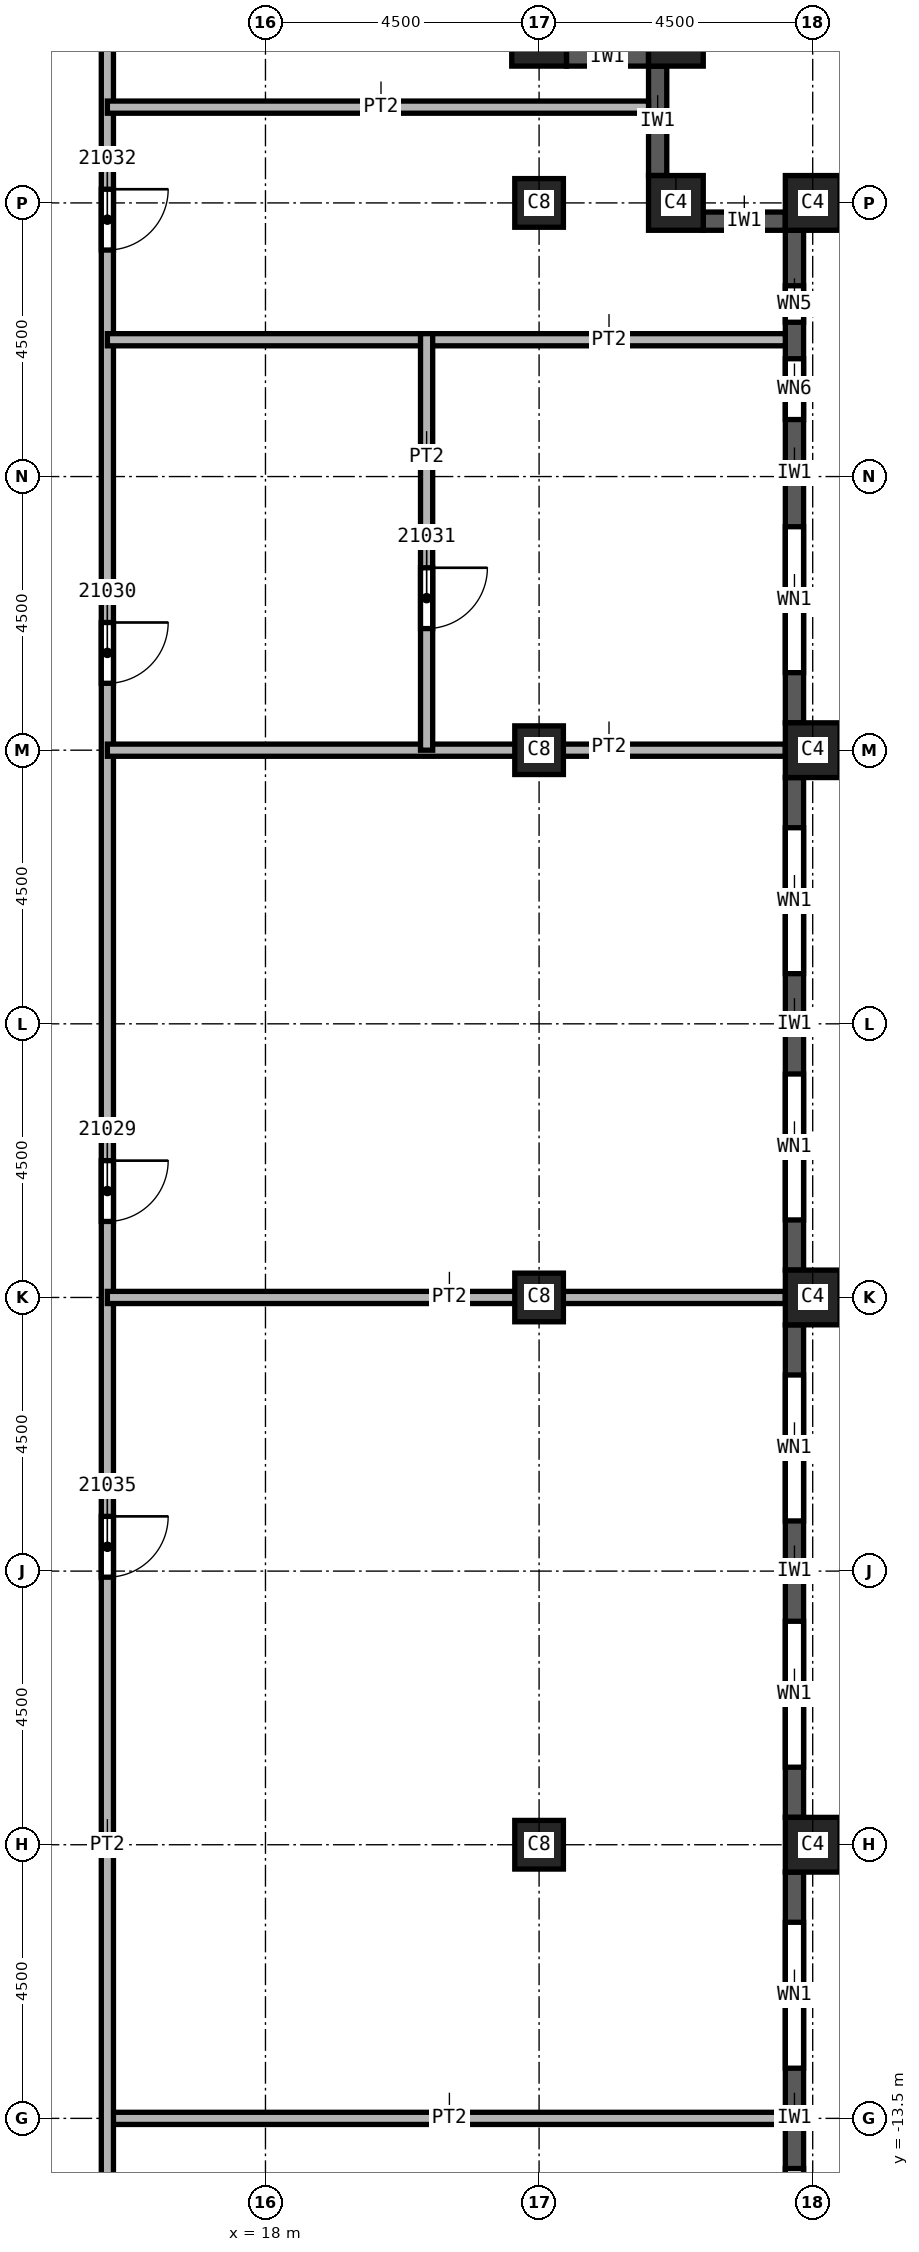
"""IFC4 building model, lengths in metres.
Left out: names, types, materials, properties, quantities, classifications, styles, units other than length and angle.
Written with IfcOpenShell. Run it as: python <this file> out.ifc"""

import sys

from ifc_helpers import new_model, si_unit, direction, frame, frame_2d, origin, origin_2d, place, context, subcontext, project, spatial, rectangle, extrude, element, fill, save


model = new_model("IFC4")
c1 = context("Model", 3, precision=1e-05, world=origin(), true_north=direction((0.0, 1.0)))
c2 = subcontext(c1, "Body", "Model", "MODEL_VIEW")
j1 = project(units=[si_unit("LENGTHUNIT", "METRE"), si_unit("PLANEANGLEUNIT", "RADIAN")], contexts=[c1])
p1 = place(None, origin())
s1 = spatial("IfcSite", under=j1, at=p1, CompositionType="ELEMENT")
p2 = place(p1, origin())
s2 = spatial("IfcBuilding", under=s1, at=p2, CompositionType="ELEMENT")
p3 = place(p2, frame((0.0, 0.0, 300.0)))
s3 = spatial("IfcBuildingStorey", under=s2, at=p3, CompositionType="ELEMENT", Elevation=300.0)
for number, where, z_axis, x_axis in (
    (1, (22.5, 0.0, 0.0), (0.0, 0.0, 1.0), (1.0, 0.0, 0.0)),
    (2, (22.5, 9.0, 0.0), (0.0, 0.0, 1.0), (1.0, 0.0, 0.0)),
    (3, (22.5, 18.0, 0.0), (0.0, 0.0, 1.0), (1.0, 0.0, 0.0)),
    (4, (22.5, -9.0, 0.0), (0.0, 0.0, 1.0), (1.0, 0.0, 0.0)),
):
    element("IfcColumn", number, at=place(p3, frame(where, z_axis=z_axis, x_axis=x_axis)), inside=s3, PredefinedType="COLUMN", context=c2, shape_type="SweptSolid", body=[
        extrude(rectangle(XDim=0.8, YDim=0.8, at=origin_2d()), origin(), (0.0, 0.0, 1.0), 3.74),
    ])
for number, where, z_axis, x_axis in (
    (5, (27.0, 0.0, 0.0), (0.0, 0.0, 1.0), (0.0, 1.0, 0.0)),
    (6, (27.0, 9.0, 0.0), (0.0, 0.0, 1.0), (0.0, 1.0, 0.0)),
    (7, (27.0, 18.0, 0.0), (0.0, 0.0, 1.0), (0.0, 1.0, 0.0)),
    (8, (27.0, -9.0, 0.0), (0.0, 0.0, 1.0), (0.0, 1.0, 0.0)),
    (9, (22.5, 20.7, 0.0), (0.0, 0.0, 1.0), (1.0, 0.0, 0.0)),
    (10, (24.75, 20.7, 0.0), (0.0, 0.0, 1.0), (1.0, 0.0, 0.0)),
    (11, (24.75, 18.0, 0.0), (0.0, 0.0, 1.0), (1.0, 0.0, 0.0)),
):
    element("IfcColumn", number, at=place(p3, frame(where, z_axis=z_axis, x_axis=x_axis)), inside=s3, PredefinedType="COLUMN", context=c2, shape_type="SweptSolid", body=[
        extrude(rectangle(XDim=0.9, YDim=0.9, at=origin_2d()), origin(), (0.0, 0.0, 1.0), 3.74),
    ])
p4 = place(p3, frame((26.7, -17.55, 0.0), z_axis=(0.0, 0.0, 1.0), x_axis=(0.0, 1.0, 0.0)))
e12 = element("IfcWall", 12, at=p4, inside=s3, PredefinedType="SOLIDWALL", context=c2, shape_type="SweptSolid", body=[
    extrude(rectangle(XDim=8.1, YDim=0.3, at=frame_2d((4.05, 0.0))), origin(), (0.0, 0.0, 1.0), 3.14),
])
p5 = place(p4, frame((0.825, 0.0, 0.8)))
e13 = element("IfcOpeningElement", 13, at=p5, cuts=e12, PredefinedType="OPENING", context=c2, shape_type="SweptSolid", body=[
    extrude(rectangle(XDim=2.4, YDim=1.95, at=frame_2d((1.2, 0.975))), frame((0.0, 0.15, 0.0), z_axis=(0.0, -1.0, 0.0), x_axis=(1.0, 0.0, 0.0)), (0.0, 0.0, 1.0), 0.3),
])
p6 = place(p4, frame((4.875, 0.0, 0.8)))
e14 = element("IfcOpeningElement", 14, at=p6, cuts=e12, PredefinedType="OPENING", context=c2, shape_type="SweptSolid", body=[
    extrude(rectangle(XDim=2.4, YDim=1.95, at=frame_2d((1.2, 0.975))), frame((0.0, 0.15, 0.0), z_axis=(0.0, -1.0, 0.0), x_axis=(1.0, 0.0, 0.0)), (0.0, 0.0, 1.0), 0.3),
])
p7 = place(p3, frame((26.7, -8.55, 0.0), z_axis=(0.0, 0.0, 1.0), x_axis=(0.0, 1.0, 0.0)))
e15 = element("IfcWall", 15, at=p7, inside=s3, PredefinedType="SOLIDWALL", context=c2, shape_type="SweptSolid", body=[
    extrude(rectangle(XDim=8.1, YDim=0.3, at=frame_2d((4.05, 0.0))), origin(), (0.0, 0.0, 1.0), 3.14),
])
p8 = place(p7, frame((0.825, 0.0, 0.8)))
e16 = element("IfcOpeningElement", 16, at=p8, cuts=e15, PredefinedType="OPENING", context=c2, shape_type="SweptSolid", body=[
    extrude(rectangle(XDim=2.4, YDim=1.95, at=frame_2d((1.2, 0.975))), frame((0.0, 0.15, 0.0), z_axis=(0.0, -1.0, 0.0), x_axis=(1.0, 0.0, 0.0)), (0.0, 0.0, 1.0), 0.3),
])
p9 = place(p7, frame((4.875, 0.0, 0.8)))
e17 = element("IfcOpeningElement", 17, at=p9, cuts=e15, PredefinedType="OPENING", context=c2, shape_type="SweptSolid", body=[
    extrude(rectangle(XDim=2.4, YDim=1.95, at=frame_2d((1.2, 0.975))), frame((0.0, 0.15, 0.0), z_axis=(0.0, -1.0, 0.0), x_axis=(1.0, 0.0, 0.0)), (0.0, 0.0, 1.0), 0.3),
])
p10 = place(p3, frame((26.7, 0.45, 0.0), z_axis=(0.0, 0.0, 1.0), x_axis=(0.0, 1.0, 0.0)))
e18 = element("IfcWall", 18, at=p10, inside=s3, PredefinedType="SOLIDWALL", context=c2, shape_type="SweptSolid", body=[
    extrude(rectangle(XDim=8.1, YDim=0.3, at=frame_2d((4.05, 0.0))), origin(), (0.0, 0.0, 1.0), 3.14),
])
p11 = place(p10, frame((0.825, 0.0, 0.8)))
e19 = element("IfcOpeningElement", 19, at=p11, cuts=e18, PredefinedType="OPENING", context=c2, shape_type="SweptSolid", body=[
    extrude(rectangle(XDim=2.4, YDim=1.95, at=frame_2d((1.2, 0.975))), frame((0.0, 0.15, 0.0), z_axis=(0.0, -1.0, 0.0), x_axis=(1.0, 0.0, 0.0)), (0.0, 0.0, 1.0), 0.3),
])
p12 = place(p10, frame((4.875, 0.0, 0.8)))
e20 = element("IfcOpeningElement", 20, at=p12, cuts=e18, PredefinedType="OPENING", context=c2, shape_type="SweptSolid", body=[
    extrude(rectangle(XDim=2.4, YDim=1.95, at=frame_2d((1.2, 0.975))), frame((0.0, 0.15, 0.0), z_axis=(0.0, -1.0, 0.0), x_axis=(1.0, 0.0, 0.0)), (0.0, 0.0, 1.0), 0.3),
])
p13 = place(p3, frame((26.7, 9.45, 0.0), z_axis=(0.0, 0.0, 1.0), x_axis=(0.0, 1.0, 0.0)))
e21 = element("IfcWall", 21, at=p13, inside=s3, PredefinedType="SOLIDWALL", context=c2, shape_type="SweptSolid", body=[
    extrude(rectangle(XDim=8.1, YDim=0.3, at=frame_2d((4.05, 0.0))), origin(), (0.0, 0.0, 1.0), 3.14),
])
p14 = place(p13, frame((0.825, 0.0, 0.8)))
e22 = element("IfcOpeningElement", 22, at=p14, cuts=e21, PredefinedType="OPENING", context=c2, shape_type="SweptSolid", body=[
    extrude(rectangle(XDim=2.4, YDim=1.95, at=frame_2d((1.2, 0.975))), frame((0.0, 0.15, 0.0), z_axis=(0.0, -1.0, 0.0), x_axis=(1.0, 0.0, 0.0)), (0.0, 0.0, 1.0), 0.3),
])
p15 = place(p13, frame((4.988, 0.0, 0.8)))
e23 = element("IfcOpeningElement", 23, at=p15, cuts=e21, PredefinedType="OPENING", context=c2, shape_type="SweptSolid", body=[
    extrude(rectangle(XDim=1.0, YDim=1.95, at=frame_2d((0.5, 0.975))), frame((0.0, 0.15, 0.0), z_axis=(0.0, -1.0, 0.0), x_axis=(1.0, 0.0, 0.0)), (0.0, 0.0, 1.0), 0.3),
])
p16 = place(p13, frame((6.587, 0.0, 0.8)))
e24 = element("IfcOpeningElement", 24, at=p16, cuts=e21, PredefinedType="OPENING", context=c2, shape_type="SweptSolid", body=[
    extrude(rectangle(XDim=0.6, YDim=1.95, at=frame_2d((0.3, 0.975))), frame((0.0, 0.15, 0.0), z_axis=(0.0, -1.0, 0.0), x_axis=(1.0, 0.0, 0.0)), (0.0, 0.0, 1.0), 0.3),
])
p17 = place(p3, frame((26.55, 17.7, 0.0), z_axis=(0.0, 0.0, 1.0), x_axis=(-1.0, 0.0, 0.0)))
e25 = element("IfcWall", 25, at=p17, inside=s3, PredefinedType="SOLIDWALL", context=c2, shape_type="SweptSolid", body=[
    extrude(rectangle(XDim=1.35, YDim=0.3, at=frame_2d((0.675, 0.0))), origin(), (0.0, 0.0, 1.0), 3.14),
])
p18 = place(p3, frame((24.45, 18.45, 0.0), z_axis=(0.0, 0.0, 1.0), x_axis=(0.0, 1.0, 0.0)))
e26 = element("IfcWall", 26, at=p18, inside=s3, PredefinedType="SOLIDWALL", context=c2, shape_type="SweptSolid", body=[
    extrude(rectangle(XDim=1.8, YDim=0.3, at=frame_2d((0.9, 0.0))), origin(), (0.0, 0.0, 1.0), 3.14),
])
p19 = place(p3, frame((24.3, 20.4, 0.0), z_axis=(0.0, 0.0, 1.0), x_axis=(-1.0, 0.0, 0.0)))
e27 = element("IfcWall", 27, at=p19, inside=s3, PredefinedType="SOLIDWALL", context=c2, shape_type="SweptSolid", body=[
    extrude(rectangle(XDim=1.35, YDim=0.3, at=frame_2d((0.675, 0.0))), origin(), (0.0, 0.0, 1.0), 3.14),
])
p20 = place(p3, frame((15.4, -13.5, 0.0), z_axis=(0.0, 0.0, 1.0), x_axis=(1.0, 0.0, 0.0)))
e28 = element("IfcWall", 28, at=p20, inside=s3, PredefinedType="PARTITIONING", context=c2, shape_type="SweptSolid", body=[
    extrude(rectangle(XDim=11.15, YDim=0.2, at=frame_2d((5.575, 0.0))), origin(), (0.0, 0.0, 1.0), 3.74),
])
p21 = place(p3, frame((15.4, 22.95, 0.0), z_axis=(0.0, 0.0, 1.0), x_axis=(0.0, -1.0, 0.0)))
e29 = element("IfcWall", 29, at=p21, inside=s3, PredefinedType="PARTITIONING", context=c2, shape_type="SweptSolid", body=[
    extrude(rectangle(XDim=45.9, YDim=0.2, at=frame_2d((22.95, 0.0))), origin(), (0.0, 0.0, 1.0), 3.74),
])
p22 = place(p21, frame((20.7, 0.0, 0.0)))
e30 = element("IfcOpeningElement", 30, at=p22, cuts=e29, PredefinedType="OPENING", context=c2, shape_type="SweptSolid", body=[
    extrude(rectangle(XDim=1.0, YDim=2.1, at=frame_2d((0.5, 1.05))), frame((0.0, 0.1, 0.0), z_axis=(0.0, -1.0, 0.0), x_axis=(1.0, 0.0, 0.0)), (0.0, 0.0, 1.0), 0.2),
])
p23 = place(p21, frame((11.85, 0.0, 0.0)))
e31 = element("IfcOpeningElement", 31, at=p23, cuts=e29, PredefinedType="OPENING", context=c2, shape_type="SweptSolid", body=[
    extrude(rectangle(XDim=1.0, YDim=2.1, at=frame_2d((0.5, 1.05))), frame((0.0, 0.1, 0.0), z_axis=(0.0, -1.0, 0.0), x_axis=(1.0, 0.0, 0.0)), (0.0, 0.0, 1.0), 0.2),
])
p24 = place(p21, frame((4.725, 0.0, 0.0)))
e32 = element("IfcOpeningElement", 32, at=p24, cuts=e29, PredefinedType="OPENING", context=c2, shape_type="SweptSolid", body=[
    extrude(rectangle(XDim=1.0, YDim=2.1, at=frame_2d((0.5, 1.05))), frame((0.0, 0.1, 0.0), z_axis=(0.0, -1.0, 0.0), x_axis=(1.0, 0.0, 0.0)), (0.0, 0.0, 1.0), 0.2),
])
p25 = place(p21, frame((0.4, 0.0, 0.0)))
e33 = element("IfcOpeningElement", 33, at=p25, cuts=e29, PredefinedType="OPENING", context=c2, shape_type="SweptSolid", body=[
    extrude(rectangle(XDim=1.0, YDim=2.1, at=frame_2d((0.5, 1.05))), frame((0.0, 0.1, 0.0), z_axis=(0.0, -1.0, 0.0), x_axis=(1.0, 0.0, 0.0)), (0.0, 0.0, 1.0), 0.2),
])
p26 = place(p21, frame((38.85, 0.0, 0.0)))
e34 = element("IfcOpeningElement", 34, at=p26, cuts=e29, PredefinedType="OPENING", context=c2, shape_type="SweptSolid", body=[
    extrude(rectangle(XDim=1.0, YDim=2.1, at=frame_2d((0.5, 1.05))), frame((0.0, 0.1, 0.0), z_axis=(0.0, -1.0, 0.0), x_axis=(1.0, 0.0, 0.0)), (0.0, 0.0, 1.0), 0.2),
])
p27 = place(p21, frame((26.55, 0.0, 0.0)))
e35 = element("IfcOpeningElement", 35, at=p27, cuts=e29, PredefinedType="OPENING", context=c2, shape_type="SweptSolid", body=[
    extrude(rectangle(XDim=1.0, YDim=2.1, at=frame_2d((0.5, 1.05))), frame((0.0, 0.1, 0.0), z_axis=(0.0, -1.0, 0.0), x_axis=(1.0, 0.0, 0.0)), (0.0, 0.0, 1.0), 0.2),
])
for number, where, z_axis, x_axis in (
    (36, (15.4, 9.0, 0.0), (0.0, 0.0, 1.0), (1.0, 0.0, 0.0)),
    (37, (15.4, 15.75, 0.0), (0.0, 0.0, 1.0), (1.0, 0.0, 0.0)),
):
    element("IfcWall", number, at=place(p3, frame(where, z_axis=z_axis, x_axis=x_axis)), inside=s3, PredefinedType="PARTITIONING", context=c2, shape_type="SweptSolid", body=[
        extrude(rectangle(XDim=11.15, YDim=0.2, at=frame_2d((5.575, 0.0))), origin(), (0.0, 0.0, 1.0), 3.74),
    ])
p28 = place(p3, frame((15.4, 19.575, 0.0), z_axis=(0.0, 0.0, 1.0), x_axis=(1.0, 0.0, 0.0)))
e38 = element("IfcWall", 38, at=p28, inside=s3, PredefinedType="PARTITIONING", context=c2, shape_type="SweptSolid", body=[
    extrude(rectangle(XDim=8.9, YDim=0.2, at=frame_2d((4.45, 0.0))), origin(), (0.0, 0.0, 1.0), 3.74),
])
p29 = place(p3, frame((20.65, 15.85, 0.0), z_axis=(0.0, 0.0, 1.0), x_axis=(0.0, -1.0, 0.0)))
e39 = element("IfcWall", 39, at=p29, inside=s3, PredefinedType="PARTITIONING", context=c2, shape_type="SweptSolid", body=[
    extrude(rectangle(XDim=6.85, YDim=0.2, at=frame_2d((3.425, 0.0))), origin(), (0.0, 0.0, 1.0), 3.74),
])
p30 = place(p29, frame((3.85, 0.0, 0.0)))
e40 = element("IfcOpeningElement", 40, at=p30, cuts=e39, PredefinedType="OPENING", context=c2, shape_type="SweptSolid", body=[
    extrude(rectangle(XDim=1.0, YDim=2.1, at=frame_2d((0.5, 1.05))), frame((0.0, 0.1, 0.0), z_axis=(0.0, -1.0, 0.0), x_axis=(1.0, 0.0, 0.0)), (0.0, 0.0, 1.0), 0.2),
])
p31 = place(p3, frame((26.55, 0.0, 0.0), z_axis=(0.0, 0.0, 1.0), x_axis=(-1.0, 0.0, 0.0)))
e41 = element("IfcWall", 41, at=p31, inside=s3, PredefinedType="PARTITIONING", context=c2, shape_type="SweptSolid", body=[
    extrude(rectangle(XDim=11.15, YDim=0.2, at=frame_2d((5.575, 0.0))), origin(), (0.0, 0.0, 1.0), 3.74),
])
p32 = place(p5, origin())
e42 = element("IfcWindow", 42, at=p32, inside=s3, PartitioningType="SINGLE_PANEL", PredefinedType="WINDOW", context=c2, shape_type="SweptSolid", body=[
    extrude(rectangle(XDim=2.4, YDim=1.95, at=frame_2d((1.2, 0.975))), frame((0.0, 0.03, 0.0), z_axis=(0.0, -1.0, 0.0), x_axis=(1.0, 0.0, 0.0)), (0.0, 0.0, 1.0), 0.06),
])
fill(e13, e42)
p33 = place(p6, origin())
e43 = element("IfcWindow", 43, at=p33, inside=s3, PartitioningType="SINGLE_PANEL", PredefinedType="WINDOW", context=c2, shape_type="SweptSolid", body=[
    extrude(rectangle(XDim=2.4, YDim=1.95, at=frame_2d((1.2, 0.975))), frame((0.0, 0.03, 0.0), z_axis=(0.0, -1.0, 0.0), x_axis=(1.0, 0.0, 0.0)), (0.0, 0.0, 1.0), 0.06),
])
fill(e14, e43)
p34 = place(p8, origin())
e44 = element("IfcWindow", 44, at=p34, inside=s3, PartitioningType="SINGLE_PANEL", PredefinedType="WINDOW", context=c2, shape_type="SweptSolid", body=[
    extrude(rectangle(XDim=2.4, YDim=1.95, at=frame_2d((1.2, 0.975))), frame((0.0, 0.03, 0.0), z_axis=(0.0, -1.0, 0.0), x_axis=(1.0, 0.0, 0.0)), (0.0, 0.0, 1.0), 0.06),
])
fill(e16, e44)
p35 = place(p9, origin())
e45 = element("IfcWindow", 45, at=p35, inside=s3, PartitioningType="SINGLE_PANEL", PredefinedType="WINDOW", context=c2, shape_type="SweptSolid", body=[
    extrude(rectangle(XDim=2.4, YDim=1.95, at=frame_2d((1.2, 0.975))), frame((0.0, 0.03, 0.0), z_axis=(0.0, -1.0, 0.0), x_axis=(1.0, 0.0, 0.0)), (0.0, 0.0, 1.0), 0.06),
])
fill(e17, e45)
p36 = place(p11, origin())
e46 = element("IfcWindow", 46, at=p36, inside=s3, PartitioningType="SINGLE_PANEL", PredefinedType="WINDOW", context=c2, shape_type="SweptSolid", body=[
    extrude(rectangle(XDim=2.4, YDim=1.95, at=frame_2d((1.2, 0.975))), frame((0.0, 0.03, 0.0), z_axis=(0.0, -1.0, 0.0), x_axis=(1.0, 0.0, 0.0)), (0.0, 0.0, 1.0), 0.06),
])
fill(e19, e46)
p37 = place(p12, origin())
e47 = element("IfcWindow", 47, at=p37, inside=s3, PartitioningType="SINGLE_PANEL", PredefinedType="WINDOW", context=c2, shape_type="SweptSolid", body=[
    extrude(rectangle(XDim=2.4, YDim=1.95, at=frame_2d((1.2, 0.975))), frame((0.0, 0.03, 0.0), z_axis=(0.0, -1.0, 0.0), x_axis=(1.0, 0.0, 0.0)), (0.0, 0.0, 1.0), 0.06),
])
fill(e20, e47)
p38 = place(p14, origin())
e48 = element("IfcWindow", 48, at=p38, inside=s3, PartitioningType="SINGLE_PANEL", PredefinedType="WINDOW", context=c2, shape_type="SweptSolid", body=[
    extrude(rectangle(XDim=2.4, YDim=1.95, at=frame_2d((1.2, 0.975))), frame((0.0, 0.03, 0.0), z_axis=(0.0, -1.0, 0.0), x_axis=(1.0, 0.0, 0.0)), (0.0, 0.0, 1.0), 0.06),
])
fill(e22, e48)
p39 = place(p22, origin())
e49 = element("IfcDoor", 49, at=p39, inside=s3, OperationType="SINGLE_SWING_RIGHT", PredefinedType="DOOR", context=c2, shape_type="SweptSolid", body=[
    extrude(rectangle(XDim=1.0, YDim=2.1, at=frame_2d((0.5, 1.05))), frame((0.0, 0.025, 0.0), z_axis=(0.0, -1.0, 0.0), x_axis=(1.0, 0.0, 0.0)), (0.0, 0.0, 1.0), 0.05),
])
fill(e30, e49)
p40 = place(p23, origin())
e50 = element("IfcDoor", 50, at=p40, inside=s3, OperationType="SINGLE_SWING_LEFT", PredefinedType="DOOR", context=c2, shape_type="SweptSolid", body=[
    extrude(rectangle(XDim=1.0, YDim=2.1, at=frame_2d((0.5, 1.05))), frame((0.0, 0.025, 0.0), z_axis=(0.0, -1.0, 0.0), x_axis=(1.0, 0.0, 0.0)), (0.0, 0.0, 1.0), 0.05),
])
fill(e31, e50)
p41 = place(p30, origin())
e51 = element("IfcDoor", 51, at=p41, inside=s3, OperationType="SINGLE_SWING_RIGHT", PredefinedType="DOOR", context=c2, shape_type="SweptSolid", body=[
    extrude(rectangle(XDim=1.0, YDim=2.1, at=frame_2d((0.5, 1.05))), frame((0.0, 0.025, 0.0), z_axis=(0.0, -1.0, 0.0), x_axis=(1.0, 0.0, 0.0)), (0.0, 0.0, 1.0), 0.05),
])
fill(e40, e51)
p42 = place(p24, origin())
e52 = element("IfcDoor", 52, at=p42, inside=s3, OperationType="SINGLE_SWING_LEFT", PredefinedType="DOOR", context=c2, shape_type="SweptSolid", body=[
    extrude(rectangle(XDim=1.0, YDim=2.1, at=frame_2d((0.5, 1.05))), frame((0.0, 0.025, 0.0), z_axis=(0.0, -1.0, 0.0), x_axis=(1.0, 0.0, 0.0)), (0.0, 0.0, 1.0), 0.05),
])
fill(e32, e52)
p43 = place(p27, origin())
e53 = element("IfcDoor", 53, at=p43, inside=s3, OperationType="SINGLE_SWING_RIGHT", PredefinedType="DOOR", context=c2, shape_type="SweptSolid", body=[
    extrude(rectangle(XDim=1.0, YDim=2.1, at=frame_2d((0.5, 1.05))), frame((0.0, 0.025, 0.0), z_axis=(0.0, -1.0, 0.0), x_axis=(1.0, 0.0, 0.0)), (0.0, 0.0, 1.0), 0.05),
])
fill(e35, e53)
p44 = place(p15, origin())
e54 = element("IfcWindow", 54, at=p44, inside=s3, PartitioningType="SINGLE_PANEL", PredefinedType="WINDOW", context=c2, shape_type="SweptSolid", body=[
    extrude(rectangle(XDim=1.0, YDim=1.95, at=frame_2d((0.5, 0.975))), frame((0.0, 0.03, 0.0), z_axis=(0.0, -1.0, 0.0), x_axis=(1.0, 0.0, 0.0)), (0.0, 0.0, 1.0), 0.06),
])
fill(e23, e54)
p45 = place(p16, origin())
e55 = element("IfcWindow", 55, at=p45, inside=s3, PartitioningType="SINGLE_PANEL", PredefinedType="WINDOW", context=c2, shape_type="SweptSolid", body=[
    extrude(rectangle(XDim=0.6, YDim=1.95, at=frame_2d((0.3, 0.975))), frame((0.0, 0.03, 0.0), z_axis=(0.0, -1.0, 0.0), x_axis=(1.0, 0.0, 0.0)), (0.0, 0.0, 1.0), 0.06),
])
fill(e24, e55)
save(model, sys.argv[1])
